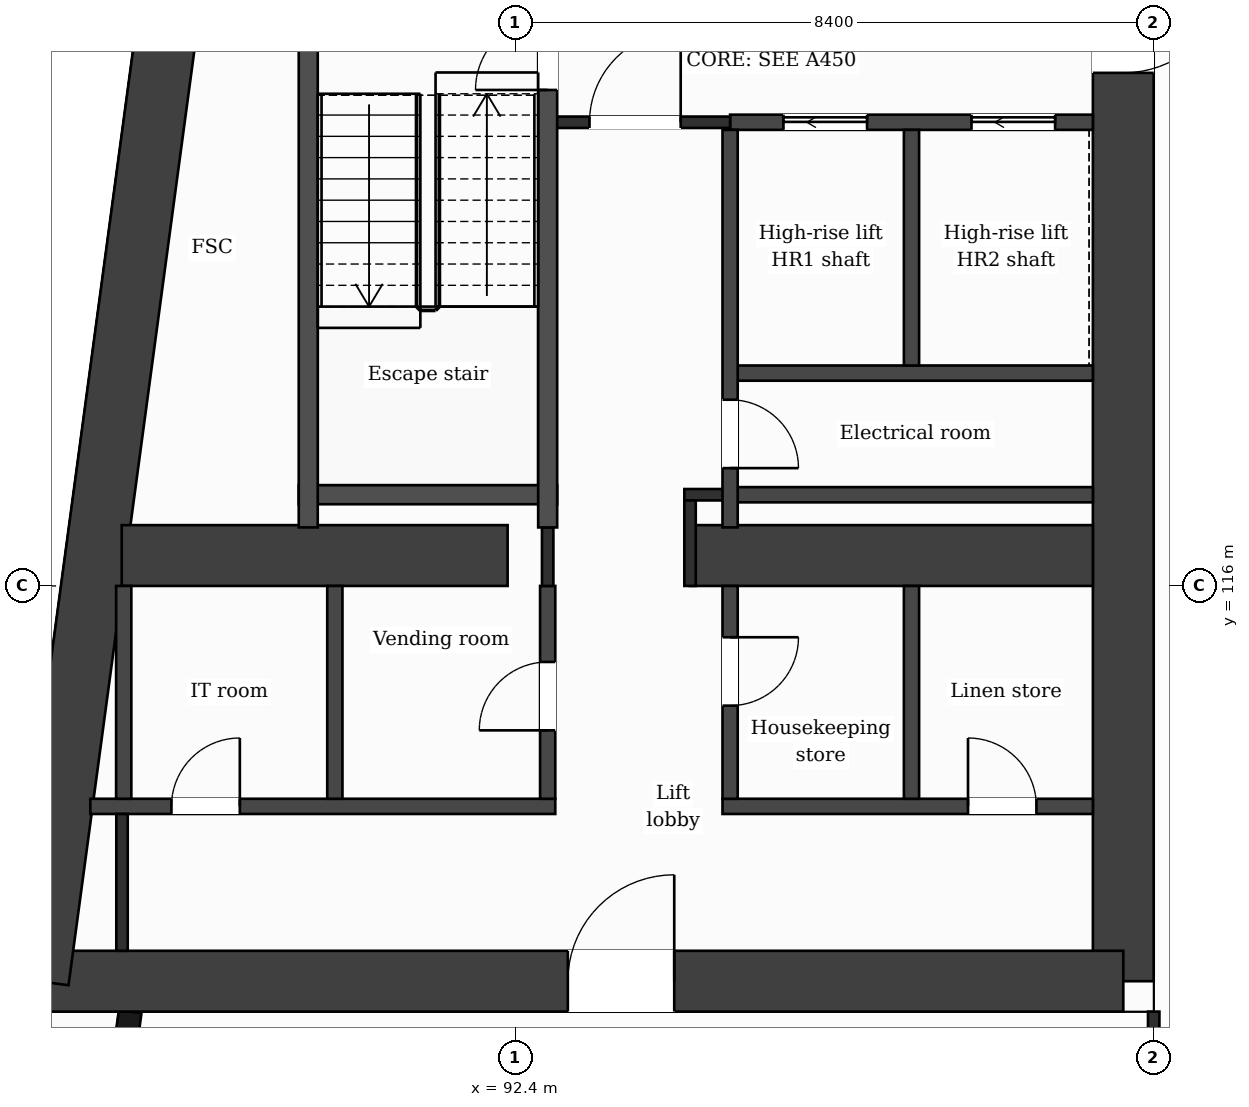
"""IFC4 building model, lengths in metres.
Left out: names, types, materials, properties, quantities, classifications, styles, units other than length and angle.
Written with IfcOpenShell. Run it as: python <this file> out.ifc"""

import sys

from ifc_helpers import new_model, si_unit, direction, frame, frame_2d, origin, place, context, subcontext, project, spatial, rectangle, extrude, element, fill, save


model = new_model("IFC4")
c1 = context("Model", 3, precision=1e-05, world=origin(), true_north=direction((0.0, 1.0)))
c2 = subcontext(c1, "Body", "Model", "MODEL_VIEW")
j1 = project(units=[si_unit("LENGTHUNIT", "METRE"), si_unit("PLANEANGLEUNIT", "RADIAN")], contexts=[c1])
p1 = place(None, origin())
s1 = spatial("IfcSite", under=j1, at=p1, CompositionType="ELEMENT")
p2 = place(p1, origin())
s2 = spatial("IfcBuilding", under=s1, at=p2, CompositionType="ELEMENT")
p3 = place(p2, frame((0.0, 0.0, 205.9)))
s3 = spatial("IfcBuildingStorey", under=s2, at=p3, CompositionType="ELEMENT", Elevation=205.9)
p4 = place(p3, frame((100.4, 132.0, 0.0), z_axis=(0.0, 0.0, 1.0), x_axis=(0.0, -1.0, 0.0)))
e1 = element("IfcWall", 1, at=p4, inside=s3, PredefinedType="SHEAR", context=c2, shape_type="SweptSolid", body=[
    extrude(rectangle(XDim=21.2, YDim=0.8, at=frame_2d((10.6, 0.0))), origin(), (0.0, 0.0, 1.0), 3.7),
])
p5 = place(p4, frame((7.85, 0.0, 0.0)))
e2 = element("IfcOpeningElement", 2, at=p5, cuts=e1, PredefinedType="OPENING", context=c2, shape_type="SweptSolid", body=[
    extrude(rectangle(XDim=1.4, YDim=2.1, at=frame_2d((0.7, 1.05))), frame((0.0, 0.41, 0.0), z_axis=(0.0, -1.0, 0.0), x_axis=(1.0, 0.0, 0.0)), (0.0, 0.0, 1.0), 0.82),
])
p6 = place(p3, frame((100.4, 110.8, 0.0), z_axis=(0.0, 0.0, 1.0), x_axis=(-1.0, 0.0, 0.0)))
e3 = element("IfcWall", 3, at=p6, inside=s3, PredefinedType="SHEAR", context=c2, shape_type="SweptSolid", body=[
    extrude(rectangle(XDim=14.273, YDim=0.8, at=frame_2d((7.137, 0.0))), origin(), (0.0, 0.0, 1.0), 3.7),
])
p7 = place(p6, frame((5.908, 0.0, 0.0)))
e4 = element("IfcOpeningElement", 4, at=p7, cuts=e3, PredefinedType="OPENING", context=c2, shape_type="SweptSolid", body=[
    extrude(rectangle(XDim=1.4, YDim=2.1, at=frame_2d((0.7, 1.05))), frame((0.0, 0.41, 0.0), z_axis=(0.0, -1.0, 0.0), x_axis=(1.0, 0.0, 0.0)), (0.0, 0.0, 1.0), 0.82),
])
p8 = place(p3, frame((86.127, 110.8, 0.0), z_axis=(0.0, 0.0, 1.0), x_axis=(0.133408347329, 0.991061154956, 0.0)))
e5 = element("IfcWall", 5, at=p8, inside=s3, PredefinedType="SHEAR", context=c2, shape_type="SweptSolid", body=[
    extrude(rectangle(XDim=21.391, YDim=0.8, at=frame_2d((10.696, 0.0))), origin(), (0.0, 0.0, 1.0), 3.7),
])
p9 = place(p3, frame((87.223, 116.4, 0.0), z_axis=(0.0, 0.0, 1.0), x_axis=(1.0, 0.0, 0.0)))
e6 = element("IfcWall", 6, at=p9, inside=s3, PredefinedType="SHEAR", context=c2, shape_type="SweptSolid", body=[
    extrude(rectangle(XDim=5.077, YDim=0.8, at=frame_2d((2.539, 0.0))), origin(), (0.0, 0.0, 1.0), 3.7),
])
p10 = place(p3, frame((94.7, 116.4, 0.0), z_axis=(0.0, 0.0, 1.0), x_axis=(1.0, 0.0, 0.0)))
e7 = element("IfcWall", 7, at=p10, inside=s3, PredefinedType="SHEAR", context=c2, shape_type="SweptSolid", body=[
    extrude(rectangle(XDim=5.3, YDim=0.8, at=frame_2d((2.65, 0.0))), origin(), (0.0, 0.0, 1.0), 3.7),
])
p11 = place(p3, frame((87.334, 110.4, 0.0), z_axis=(0.0, 0.0, 1.0), x_axis=(-0.133437175554, -0.991057273915, 0.0)))
e8 = element("IfcWall", 8, at=p11, inside=s3, PredefinedType="SOLIDWALL", context=c2, shape_type="SweptSolid", body=[
    extrude(rectangle(XDim=6.781, YDim=0.3, at=frame_2d((3.39, 0.0))), origin(), (0.0, 0.0, 1.0), 3.38),
])
p12 = place(p11, frame((1.418, 0.0, 0.0)))
e9 = element("IfcOpeningElement", 9, at=p12, cuts=e8, PredefinedType="OPENING", context=c2, shape_type="SweptSolid", body=[
    extrude(rectangle(XDim=1.2, YDim=2.4, at=frame_2d((0.6, 1.2))), frame((0.0, 0.16, 0.0), z_axis=(0.0, -1.0, 0.0), x_axis=(1.0, 0.0, 0.0)), (0.0, 0.0, 1.0), 0.32),
])
p13 = place(p11, frame((4.758, 0.0, 0.9)))
e10 = element("IfcOpeningElement", 10, at=p13, cuts=e8, PredefinedType="OPENING", context=c2, shape_type="SweptSolid", body=[
    extrude(rectangle(XDim=1.2, YDim=2.1, at=frame_2d((0.6, 1.05))), frame((0.0, 0.16, 0.0), z_axis=(0.0, -1.0, 0.0), x_axis=(1.0, 0.0, 0.0)), (0.0, 0.0, 1.0), 0.32),
])
p14 = place(p3, frame((86.81, 113.1, 0.0), z_axis=(0.0, 0.0, 1.0), x_axis=(1.0, 0.0, 0.0)))
e11 = element("IfcWall", 11, at=p14, inside=s3, PredefinedType="PARTITIONING", context=c2, shape_type="SweptSolid", body=[
    extrude(rectangle(XDim=6.117, YDim=0.2, at=frame_2d((3.059, 0.0))), origin(), (0.0, 0.0, 1.0), 3.38),
])
p15 = place(p14, frame((1.067, 0.0, 0.0)))
e12 = element("IfcOpeningElement", 12, at=p15, cuts=e11, PredefinedType="OPENING", context=c2, shape_type="SweptSolid", body=[
    extrude(rectangle(XDim=0.9, YDim=2.1, at=frame_2d((0.45, 1.05))), frame((0.0, 0.11, 0.0), z_axis=(0.0, -1.0, 0.0), x_axis=(1.0, 0.0, 0.0)), (0.0, 0.0, 1.0), 0.22),
])
p16 = place(p3, frame((95.127, 113.1, 0.0), z_axis=(0.0, 0.0, 1.0), x_axis=(1.0, 0.0, 0.0)))
e13 = element("IfcWall", 13, at=p16, inside=s3, PredefinedType="PARTITIONING", context=c2, shape_type="SweptSolid", body=[
    extrude(rectangle(XDim=4.873, YDim=0.2, at=frame_2d((2.437, 0.0))), origin(), (0.0, 0.0, 1.0), 3.38),
])
p17 = place(p16, frame((3.23, 0.0, 0.0)))
e14 = element("IfcOpeningElement", 14, at=p17, cuts=e13, PredefinedType="OPENING", context=c2, shape_type="SweptSolid", body=[
    extrude(rectangle(XDim=0.9, YDim=2.1, at=frame_2d((0.45, 1.05))), frame((0.0, 0.11, 0.0), z_axis=(0.0, -1.0, 0.0), x_axis=(1.0, 0.0, 0.0)), (0.0, 0.0, 1.0), 0.22),
])
p18 = place(p3, frame((95.227, 117.2, 0.0), z_axis=(0.0, 0.0, 1.0), x_axis=(1.0, 0.0, 0.0)))
e15 = element("IfcWall", 15, at=p18, inside=s3, PredefinedType="PARTITIONING", context=c2, shape_type="SweptSolid", body=[
    extrude(rectangle(XDim=4.773, YDim=0.2, at=frame_2d((2.386, 0.0))), origin(), (0.0, 0.0, 1.0), 3.38),
])
p19 = place(p3, frame((94.625, 117.2, 0.0), z_axis=(0.0, 0.0, 1.0), x_axis=(1.0, 0.0, 0.0)))
e16 = element("IfcWall", 16, at=p19, inside=s3, PredefinedType="PARTITIONING", context=c2, shape_type="SweptSolid", body=[
    extrude(rectangle(XDim=0.602, YDim=0.15, at=frame_2d((0.301, 0.0))), origin(), (0.0, 0.0, 1.0), 3.38),
])
p20 = place(p3, frame((89.552, 117.2, 0.0), z_axis=(0.0, 0.0, 1.0), x_axis=(1.0, 0.0, 0.0)))
e17 = element("IfcWall", 17, at=p20, inside=s3, PredefinedType="PARTITIONING", context=c2, shape_type="SweptSolid", body=[
    extrude(rectangle(XDim=3.4, YDim=0.25, at=frame_2d((1.7, 0.0))), origin(), (0.0, 0.0, 1.0), 3.38),
])
p21 = place(p3, frame((95.227, 118.8, 0.0), z_axis=(0.0, 0.0, 1.0), x_axis=(1.0, 0.0, 0.0)))
e18 = element("IfcWall", 18, at=p21, inside=s3, PredefinedType="PARTITIONING", context=c2, shape_type="SweptSolid", body=[
    extrude(rectangle(XDim=4.773, YDim=0.2, at=frame_2d((2.386, 0.0))), origin(), (0.0, 0.0, 1.0), 3.38),
])
p22 = place(p3, frame((95.227, 122.1, 0.0), z_axis=(0.0, 0.0, 1.0), x_axis=(1.0, 0.0, 0.0)))
e19 = element("IfcWall", 19, at=p22, inside=s3, PredefinedType="PARTITIONING", context=c2, shape_type="SweptSolid", body=[
    extrude(rectangle(XDim=4.773, YDim=0.2, at=frame_2d((2.386, 0.0))), origin(), (0.0, 0.0, 1.0), 3.38),
])
p23 = place(p22, frame((0.702, 0.0, 0.0)))
e20 = element("IfcOpeningElement", 20, at=p23, cuts=e19, PredefinedType="OPENING", context=c2, shape_type="SweptSolid", body=[
    extrude(rectangle(XDim=1.1, YDim=2.1, at=frame_2d((0.55, 1.05))), frame((0.0, 0.11, 0.0), z_axis=(0.0, -1.0, 0.0), x_axis=(1.0, 0.0, 0.0)), (0.0, 0.0, 1.0), 0.22),
])
p24 = place(p22, frame((3.176, 0.0, 0.0)))
e21 = element("IfcOpeningElement", 21, at=p24, cuts=e19, PredefinedType="OPENING", context=c2, shape_type="SweptSolid", body=[
    extrude(rectangle(XDim=1.1, YDim=2.1, at=frame_2d((0.55, 1.05))), frame((0.0, 0.11, 0.0), z_axis=(0.0, -1.0, 0.0), x_axis=(1.0, 0.0, 0.0)), (0.0, 0.0, 1.0), 0.22),
])
p25 = place(p3, frame((92.827, 122.1, 0.0), z_axis=(0.0, 0.0, 1.0), x_axis=(1.0, 0.0, 0.0)))
e22 = element("IfcWall", 22, at=p25, inside=s3, PredefinedType="PARTITIONING", context=c2, shape_type="SweptSolid", body=[
    extrude(rectangle(XDim=2.4, YDim=0.15, at=frame_2d((1.2, 0.0))), origin(), (0.0, 0.0, 1.0), 3.38),
])
p26 = place(p25, frame((0.55, 0.0, 0.0)))
e23 = element("IfcOpeningElement", 23, at=p26, cuts=e22, PredefinedType="OPENING", context=c2, shape_type="SweptSolid", body=[
    extrude(rectangle(XDim=1.2, YDim=2.1, at=frame_2d((0.6, 1.05))), frame((0.0, 0.085, 0.0), z_axis=(0.0, -1.0, 0.0), x_axis=(1.0, 0.0, 0.0)), (0.0, 0.0, 1.0), 0.17),
])
p27 = place(p3, frame((87.25, 113.2, 0.0), z_axis=(0.0, 0.0, 1.0), x_axis=(0.0, 1.0, 0.0)))
e24 = element("IfcWall", 24, at=p27, inside=s3, PredefinedType="PARTITIONING", context=c2, shape_type="SweptSolid", body=[
    extrude(rectangle(XDim=2.8, YDim=0.2, at=frame_2d((1.4, 0.0))), origin(), (0.0, 0.0, 1.0), 3.38),
])
p28 = place(p3, frame((87.227, 111.2, 0.0), z_axis=(0.0, 0.0, 1.0), x_axis=(0.0, 1.0, 0.0)))
e25 = element("IfcWall", 25, at=p28, inside=s3, PredefinedType="PARTITIONING", context=c2, shape_type="SweptSolid", body=[
    extrude(rectangle(XDim=1.8, YDim=0.15, at=frame_2d((0.9, 0.0))), origin(), (0.0, 0.0, 1.0), 3.38),
])
p29 = place(p3, frame((89.677, 116.77, 0.0), z_axis=(0.0, 0.0, 1.0), x_axis=(0.0, 1.0, 0.0)))
e26 = element("IfcWall", 26, at=p29, inside=s3, PredefinedType="PARTITIONING", context=c2, shape_type="SweptSolid", body=[
    extrude(rectangle(XDim=7.055, YDim=0.25, at=frame_2d((3.527, 0.0))), origin(), (0.0, 0.0, 1.0), 3.38),
])
p30 = place(p3, frame((90.027, 113.2, 0.0), z_axis=(0.0, 0.0, 1.0), x_axis=(0.0, 1.0, 0.0)))
e27 = element("IfcWall", 27, at=p30, inside=s3, PredefinedType="PARTITIONING", context=c2, shape_type="SweptSolid", body=[
    extrude(rectangle(XDim=2.8, YDim=0.2, at=frame_2d((1.4, 0.0))), origin(), (0.0, 0.0, 1.0), 3.38),
])
p31 = place(p3, frame((92.827, 113.2, 0.0), z_axis=(0.0, 0.0, 1.0), x_axis=(0.0, 1.0, 0.0)))
e28 = element("IfcWall", 28, at=p31, inside=s3, PredefinedType="PARTITIONING", context=c2, shape_type="SweptSolid", body=[
    extrude(rectangle(XDim=2.8, YDim=0.2, at=frame_2d((1.4, 0.0))), origin(), (0.0, 0.0, 1.0), 3.38),
])
p32 = place(p31, frame((0.9, 0.0, 0.0)))
e29 = element("IfcOpeningElement", 29, at=p32, cuts=e28, PredefinedType="OPENING", context=c2, shape_type="SweptSolid", body=[
    extrude(rectangle(XDim=0.9, YDim=2.1, at=frame_2d((0.45, 1.05))), frame((0.0, 0.11, 0.0), z_axis=(0.0, -1.0, 0.0), x_axis=(1.0, 0.0, 0.0)), (0.0, 0.0, 1.0), 0.22),
])
p33 = place(p3, frame((92.827, 116.0, 0.0), z_axis=(0.0, 0.0, 1.0), x_axis=(0.0, 1.0, 0.0)))
e30 = element("IfcWall", 30, at=p33, inside=s3, PredefinedType="PARTITIONING", context=c2, shape_type="SweptSolid", body=[
    extrude(rectangle(XDim=0.77, YDim=0.15, at=frame_2d((0.385, 0.0))), origin(), (0.0, 0.0, 1.0), 3.38),
])
p34 = place(p3, frame((92.827, 116.77, 0.0), z_axis=(0.0, 0.0, 1.0), x_axis=(0.0, 1.0, 0.0)))
e31 = element("IfcWall", 31, at=p34, inside=s3, PredefinedType="PARTITIONING", context=c2, shape_type="SweptSolid", body=[
    extrude(rectangle(XDim=7.055, YDim=0.25, at=frame_2d((3.527, 0.0))), origin(), (0.0, 0.0, 1.0), 3.38),
])
p35 = place(p34, frame((5.755, 0.0, 0.0)))
e32 = element("IfcOpeningElement", 32, at=p35, cuts=e31, PredefinedType="OPENING", context=c2, shape_type="SweptSolid", body=[
    extrude(rectangle(XDim=0.95, YDim=2.1, at=frame_2d((0.475, 1.05))), frame((0.0, 0.135, 0.0), z_axis=(0.0, -1.0, 0.0), x_axis=(1.0, 0.0, 0.0)), (0.0, 0.0, 1.0), 0.27),
])
p36 = place(p3, frame((94.7, 116.0, 0.0), z_axis=(0.0, 0.0, 1.0), x_axis=(0.0, 1.0, 0.0)))
e33 = element("IfcWall", 33, at=p36, inside=s3, PredefinedType="PARTITIONING", context=c2, shape_type="SweptSolid", body=[
    extrude(rectangle(XDim=1.125, YDim=0.15, at=frame_2d((0.562, 0.0))), origin(), (0.0, 0.0, 1.0), 3.38),
])
p37 = place(p3, frame((95.227, 113.2, 0.0), z_axis=(0.0, 0.0, 1.0), x_axis=(0.0, 1.0, 0.0)))
e34 = element("IfcWall", 34, at=p37, inside=s3, PredefinedType="PARTITIONING", context=c2, shape_type="SweptSolid", body=[
    extrude(rectangle(XDim=2.8, YDim=0.2, at=frame_2d((1.4, 0.0))), origin(), (0.0, 0.0, 1.0), 3.38),
])
p38 = place(p37, frame((1.225, 0.0, 0.0)))
e35 = element("IfcOpeningElement", 35, at=p38, cuts=e34, PredefinedType="OPENING", context=c2, shape_type="SweptSolid", body=[
    extrude(rectangle(XDim=0.9, YDim=2.1, at=frame_2d((0.45, 1.05))), frame((0.0, 0.11, 0.0), z_axis=(0.0, -1.0, 0.0), x_axis=(1.0, 0.0, 0.0)), (0.0, 0.0, 1.0), 0.22),
])
p39 = place(p3, frame((95.227, 116.77, 0.0), z_axis=(0.0, 0.0, 1.0), x_axis=(0.0, 1.0, 0.0)))
e36 = element("IfcWall", 36, at=p39, inside=s3, PredefinedType="PARTITIONING", context=c2, shape_type="SweptSolid", body=[
    extrude(rectangle(XDim=5.23, YDim=0.2, at=frame_2d((2.615, 0.0))), origin(), (0.0, 0.0, 1.0), 3.38),
])
p40 = place(p39, frame((0.78, 0.0, 0.0)))
e37 = element("IfcOpeningElement", 37, at=p40, cuts=e36, PredefinedType="OPENING", context=c2, shape_type="SweptSolid", body=[
    extrude(rectangle(XDim=0.9, YDim=2.1, at=frame_2d((0.45, 1.05))), frame((0.0, 0.11, 0.0), z_axis=(0.0, -1.0, 0.0), x_axis=(1.0, 0.0, 0.0)), (0.0, 0.0, 1.0), 0.22),
])
p41 = place(p3, frame((97.614, 113.2, 0.0), z_axis=(0.0, 0.0, 1.0), x_axis=(0.0, 1.0, 0.0)))
e38 = element("IfcWall", 38, at=p41, inside=s3, PredefinedType="PARTITIONING", context=c2, shape_type="SweptSolid", body=[
    extrude(rectangle(XDim=2.8, YDim=0.2, at=frame_2d((1.4, 0.0))), origin(), (0.0, 0.0, 1.0), 3.38),
])
p42 = place(p3, frame((97.614, 118.9, 0.0), z_axis=(0.0, 0.0, 1.0), x_axis=(0.0, 1.0, 0.0)))
e39 = element("IfcWall", 39, at=p42, inside=s3, PredefinedType="PARTITIONING", context=c2, shape_type="SweptSolid", body=[
    extrude(rectangle(XDim=3.1, YDim=0.2, at=frame_2d((1.55, 0.0))), origin(), (0.0, 0.0, 1.0), 3.38),
])
p43 = place(p3, frame((100.8, 109.075, 0.0), z_axis=(0.0, 0.0, 1.0), x_axis=(0.0, 1.0, 0.0)))
e40 = element("IfcWall", 40, at=p43, inside=s3, PredefinedType="PARTITIONING", context=c2, shape_type="SweptSolid", body=[
    extrude(rectangle(XDim=1.325, YDim=0.15, at=frame_2d((0.663, 0.0))), origin(), (0.0, 0.0, 1.0), 3.38),
])
p44 = place(p26, origin())
e41 = element("IfcDoor", 41, at=p44, inside=s3, OperationType="SINGLE_SWING_RIGHT", PredefinedType="DOOR", context=c2, shape_type="SweptSolid", body=[
    extrude(rectangle(XDim=1.2, YDim=2.1, at=frame_2d((0.6, 1.05))), frame((0.0, 0.025, 0.0), z_axis=(0.0, -1.0, 0.0), x_axis=(1.0, 0.0, 0.0)), (0.0, 0.0, 1.0), 0.05),
])
fill(e23, e41)
p45 = place(p23, origin())
e42 = element("IfcDoor", 42, at=p45, inside=s3, OperationType="SLIDING_TO_LEFT", PredefinedType="DOOR", context=c2, shape_type="SweptSolid", body=[
    extrude(rectangle(XDim=1.1, YDim=2.1, at=frame_2d((0.55, 1.05))), frame((0.0, 0.025, 0.0), z_axis=(0.0, -1.0, 0.0), x_axis=(1.0, 0.0, 0.0)), (0.0, 0.0, 1.0), 0.05),
])
fill(e20, e42)
p46 = place(p24, origin())
e43 = element("IfcDoor", 43, at=p46, inside=s3, OperationType="SLIDING_TO_LEFT", PredefinedType="DOOR", context=c2, shape_type="SweptSolid", body=[
    extrude(rectangle(XDim=1.1, YDim=2.1, at=frame_2d((0.55, 1.05))), frame((0.0, 0.025, 0.0), z_axis=(0.0, -1.0, 0.0), x_axis=(1.0, 0.0, 0.0)), (0.0, 0.0, 1.0), 0.05),
])
fill(e21, e43)
p47 = place(p35, origin())
e44 = element("IfcDoor", 44, at=p47, inside=s3, OperationType="SINGLE_SWING_LEFT", PredefinedType="DOOR", context=c2, shape_type="SweptSolid", body=[
    extrude(rectangle(XDim=0.95, YDim=2.1, at=frame_2d((0.475, 1.05))), frame((0.0, 0.025, 0.0), z_axis=(0.0, -1.0, 0.0), x_axis=(1.0, 0.0, 0.0)), (0.0, 0.0, 1.0), 0.05),
])
fill(e32, e44)
p48 = place(p40, origin())
e45 = element("IfcDoor", 45, at=p48, inside=s3, OperationType="SINGLE_SWING_LEFT", PredefinedType="DOOR", context=c2, shape_type="SweptSolid", body=[
    extrude(rectangle(XDim=0.9, YDim=2.1, at=frame_2d((0.45, 1.05))), frame((0.0, 0.025, 0.0), z_axis=(0.0, -1.0, 0.0), x_axis=(1.0, 0.0, 0.0)), (0.0, 0.0, 1.0), 0.05),
])
fill(e37, e45)
p49 = place(p15, origin())
e46 = element("IfcDoor", 46, at=p49, inside=s3, OperationType="SINGLE_SWING_RIGHT", PredefinedType="DOOR", context=c2, shape_type="SweptSolid", body=[
    extrude(rectangle(XDim=0.9, YDim=2.1, at=frame_2d((0.45, 1.05))), frame((0.0, 0.025, 0.0), z_axis=(0.0, -1.0, 0.0), x_axis=(1.0, 0.0, 0.0)), (0.0, 0.0, 1.0), 0.05),
])
fill(e12, e46)
p50 = place(p32, origin())
e47 = element("IfcDoor", 47, at=p50, inside=s3, OperationType="SINGLE_SWING_LEFT", PredefinedType="DOOR", context=c2, shape_type="SweptSolid", body=[
    extrude(rectangle(XDim=0.9, YDim=2.1, at=frame_2d((0.45, 1.05))), frame((0.0, 0.025, 0.0), z_axis=(0.0, -1.0, 0.0), x_axis=(1.0, 0.0, 0.0)), (0.0, 0.0, 1.0), 0.05),
])
fill(e29, e47)
p51 = place(p38, origin())
e48 = element("IfcDoor", 48, at=p51, inside=s3, OperationType="SINGLE_SWING_RIGHT", PredefinedType="DOOR", context=c2, shape_type="SweptSolid", body=[
    extrude(rectangle(XDim=0.9, YDim=2.1, at=frame_2d((0.45, 1.05))), frame((0.0, 0.025, 0.0), z_axis=(0.0, -1.0, 0.0), x_axis=(1.0, 0.0, 0.0)), (0.0, 0.0, 1.0), 0.05),
])
fill(e35, e48)
p52 = place(p17, origin())
e49 = element("IfcDoor", 49, at=p52, inside=s3, OperationType="SINGLE_SWING_LEFT", PredefinedType="DOOR", context=c2, shape_type="SweptSolid", body=[
    extrude(rectangle(XDim=0.9, YDim=2.1, at=frame_2d((0.45, 1.05))), frame((0.0, 0.025, 0.0), z_axis=(0.0, -1.0, 0.0), x_axis=(1.0, 0.0, 0.0)), (0.0, 0.0, 1.0), 0.05),
])
fill(e14, e49)
p53 = place(p7, origin())
e50 = element("IfcDoor", 50, at=p53, inside=s3, OperationType="SINGLE_SWING_LEFT", PredefinedType="DOOR", context=c2, shape_type="SweptSolid", body=[
    extrude(rectangle(XDim=1.4, YDim=2.1, at=frame_2d((0.7, 1.05))), frame((0.0, 0.025, 0.0), z_axis=(0.0, -1.0, 0.0), x_axis=(1.0, 0.0, 0.0)), (0.0, 0.0, 1.0), 0.05),
])
fill(e4, e50)
p54 = place(p5, origin())
e51 = element("IfcDoor", 51, at=p54, inside=s3, OperationType="SINGLE_SWING_LEFT", PredefinedType="DOOR", context=c2, shape_type="SweptSolid", body=[
    extrude(rectangle(XDim=1.4, YDim=2.1, at=frame_2d((0.7, 1.05))), frame((0.0, 0.025, 0.0), z_axis=(0.0, -1.0, 0.0), x_axis=(1.0, 0.0, 0.0)), (0.0, 0.0, 1.0), 0.05),
])
fill(e2, e51)
save(model, sys.argv[1])
